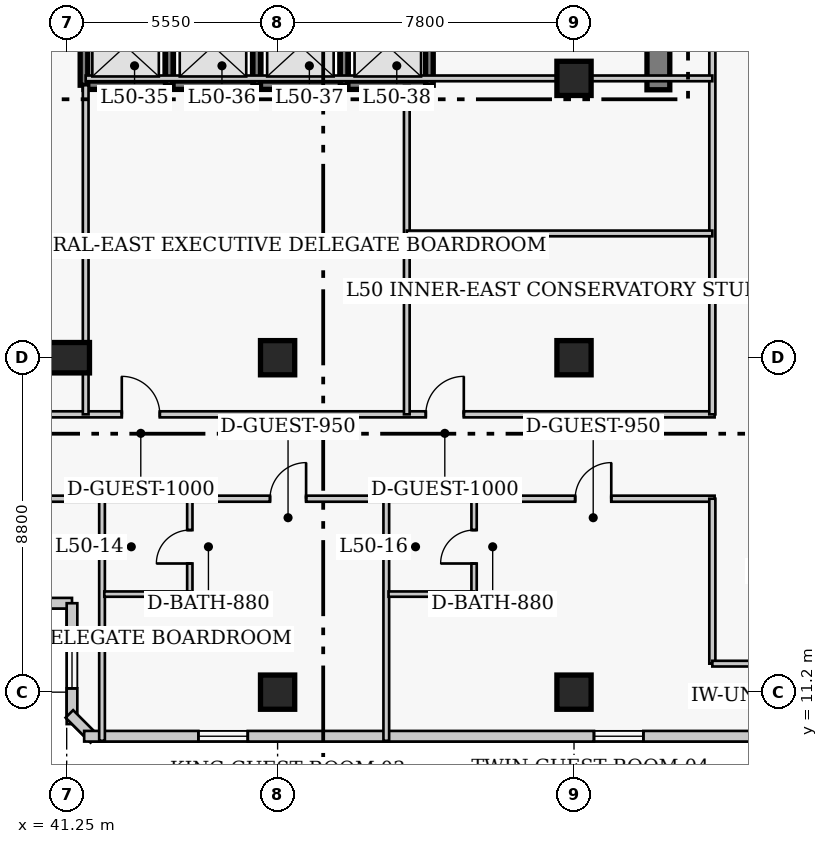
"""IFC4 building model, lengths in metres.
Left out: names, types, materials, properties, quantities, classifications, styles, units other than length and angle.
Written with IfcOpenShell. Run it as: python <this file> out.ifc"""

import sys

from ifc_helpers import new_model, si_unit, direction, frame, frame_2d, origin, origin_2d, place, context, subcontext, project, spatial, rectangle, extrude, element, fill, save


model = new_model("IFC4")
c1 = context("Model", 3, precision=1e-05, world=origin(), true_north=direction((0.0, 1.0)))
c2 = subcontext(c1, "Body", "Model", "MODEL_VIEW")
j1 = project(units=[si_unit("LENGTHUNIT", "METRE"), si_unit("PLANEANGLEUNIT", "RADIAN")], contexts=[c1])
p1 = place(None, origin())
s1 = spatial("IfcSite", under=j1, at=p1, CompositionType="ELEMENT")
p2 = place(p1, origin())
s2 = spatial("IfcBuilding", under=s1, at=p2, CompositionType="ELEMENT")
p3 = place(p2, frame((0.0, 0.0, 200.7)))
s3 = spatial("IfcBuildingStorey", under=s2, at=p3, CompositionType="ELEMENT", Elevation=200.7)
p4 = place(p3, frame((56.82, 27.05, 0.0), z_axis=(0.0, 0.0, 1.0), x_axis=(0.0, 1.0, 0.0)))
e1 = element("IfcWall", 1, at=p4, inside=s3, PredefinedType="SHEAR", context=c2, shape_type="SweptSolid", body=[
    extrude(rectangle(XDim=13.57, YDim=0.6, at=frame_2d((6.785, 0.0))), origin(), (0.0, 0.0, 1.0), 3.9),
])
p5 = place(p3, frame((41.25, 20.0, 0.0), z_axis=(0.0, 0.0, 1.0), x_axis=(1.0, 0.0, 0.0)))
e2 = element("IfcColumn", 2, at=p5, inside=s3, PredefinedType="COLUMN", context=c2, shape_type="SweptSolid", body=[
    extrude(rectangle(XDim=1.2, YDim=0.8, at=origin_2d()), origin(), (0.0, 0.0, 1.0), 3.9),
])
for number, where, z_axis, x_axis in (
    (3, (46.8, 11.2, 0.0), (0.0, 0.0, 1.0), (1.0, 0.0, 0.0)),
    (4, (46.8, 20.0, 0.0), (0.0, 0.0, 1.0), (1.0, 0.0, 0.0)),
    (5, (54.6, 11.2, 0.0), (0.0, 0.0, 1.0), (1.0, 0.0, 0.0)),
    (6, (54.6, 20.0, 0.0), (0.0, 0.0, 1.0), (1.0, 0.0, 0.0)),
    (7, (54.6, 27.35, 0.0), (0.0, 0.0, 1.0), (1.0, 0.0, 0.0)),
):
    element("IfcColumn", number, at=place(p3, frame(where, z_axis=z_axis, x_axis=x_axis)), inside=s3, PredefinedType="COLUMN", context=c2, shape_type="SweptSolid", body=[
        extrude(rectangle(XDim=0.9, YDim=0.9, at=origin_2d()), origin(), (0.0, 0.0, 1.0), 3.9),
    ])
p6 = place(p3, frame((36.61, 13.54, 0.0), z_axis=(0.0, 0.0, 1.0), x_axis=(1.0, 0.0, 0.0)))
e8 = element("IfcWall", 8, at=p6, inside=s3, PredefinedType="SOLIDWALL", context=c2, shape_type="SweptSolid", body=[
    extrude(rectangle(XDim=4.78, YDim=0.28, at=frame_2d((2.39, 0.0))), origin(), (0.0, 0.0, 1.0), 3.65),
])
p7 = place(p6, frame((1.74, 0.0, 0.85)))
e9 = element("IfcOpeningElement", 9, at=p7, cuts=e8, PredefinedType="OPENING", context=c2, shape_type="SweptSolid", body=[
    extrude(rectangle(XDim=1.3, YDim=1.7, at=frame_2d((0.65, 0.85))), frame((0.0, 0.15, 0.0), z_axis=(0.0, -1.0, 0.0), x_axis=(1.0, 0.0, 0.0)), (0.0, 0.0, 1.0), 0.3),
])
p8 = place(p3, frame((41.39, 13.54, 0.0), z_axis=(0.0, 0.0, 1.0), x_axis=(0.0, -1.0, 0.0)))
e10 = element("IfcWall", 10, at=p8, inside=s3, PredefinedType="SOLIDWALL", context=c2, shape_type="SweptSolid", body=[
    extrude(rectangle(XDim=3.18, YDim=0.28, at=frame_2d((1.59, 0.0))), origin(), (0.0, 0.0, 1.0), 3.65),
])
p9 = place(p8, frame((0.94, 0.0, 0.85)))
e11 = element("IfcOpeningElement", 11, at=p9, cuts=e10, PredefinedType="OPENING", context=c2, shape_type="SweptSolid", body=[
    extrude(rectangle(XDim=1.3, YDim=1.7, at=frame_2d((0.65, 0.85))), frame((0.0, 0.15, 0.0), z_axis=(0.0, -1.0, 0.0), x_axis=(1.0, 0.0, 0.0)), (0.0, 0.0, 1.0), 0.3),
])
p10 = place(p3, frame((41.321, 10.627, 0.0), z_axis=(0.0, 0.0, 1.0), x_axis=(0.707106781187, -0.707106781187, 0.0)))
e12 = element("IfcWall", 12, at=p10, inside=s3, PredefinedType="SOLIDWALL", context=c2, shape_type="SweptSolid", body=[
    extrude(rectangle(XDim=0.928, YDim=0.28, at=frame_2d((0.464, 0.0))), origin(), (0.0, 0.0, 1.0), 3.65),
])
p11 = place(p3, frame((41.71, 10.04, 0.0), z_axis=(0.0, 0.0, 1.0), x_axis=(1.0, 0.0, 0.0)))
e13 = element("IfcWall", 13, at=p11, inside=s3, PredefinedType="SOLIDWALL", context=c2, shape_type="SweptSolid", body=[
    extrude(rectangle(XDim=25.83, YDim=0.28, at=frame_2d((12.915, 0.0))), origin(), (0.0, 0.0, 1.0), 3.65),
])
p12 = place(p11, frame((3.005, 0.0, 0.85)))
e14 = element("IfcOpeningElement", 14, at=p12, cuts=e13, PredefinedType="OPENING", context=c2, shape_type="SweptSolid", body=[
    extrude(rectangle(XDim=1.3, YDim=1.7, at=frame_2d((0.65, 0.85))), frame((0.0, 0.15, 0.0), z_axis=(0.0, -1.0, 0.0), x_axis=(1.0, 0.0, 0.0)), (0.0, 0.0, 1.0), 0.3),
])
p13 = place(p11, frame((13.415, 0.0, 0.85)))
e15 = element("IfcOpeningElement", 15, at=p13, cuts=e13, PredefinedType="OPENING", context=c2, shape_type="SweptSolid", body=[
    extrude(rectangle(XDim=1.3, YDim=1.7, at=frame_2d((0.65, 0.85))), frame((0.0, 0.15, 0.0), z_axis=(0.0, -1.0, 0.0), x_axis=(1.0, 0.0, 0.0)), (0.0, 0.0, 1.0), 0.3),
])
p14 = place(p11, frame((21.525, 0.0, 0.85)))
e16 = element("IfcOpeningElement", 16, at=p14, cuts=e13, PredefinedType="OPENING", context=c2, shape_type="SweptSolid", body=[
    extrude(rectangle(XDim=1.3, YDim=1.7, at=frame_2d((0.65, 0.85))), frame((0.0, 0.15, 0.0), z_axis=(0.0, -1.0, 0.0), x_axis=(1.0, 0.0, 0.0)), (0.0, 0.0, 1.0), 0.3),
])
p15 = place(p3, frame((41.705, 27.17, 0.0), z_axis=(0.0, 0.0, 1.0), x_axis=(1.0, 0.0, 0.0)))
e17 = element("IfcWall", 17, at=p15, inside=s3, PredefinedType="SHEAR", context=c2, shape_type="SweptSolid", body=[
    extrude(rectangle(XDim=2.245, YDim=0.22, at=frame_2d((1.123, 0.0))), origin(), (0.0, 0.0, 1.0), 3.9),
])
p16 = place(p3, frame((41.705, 27.17, 0.0), z_axis=(0.0, 0.0, 1.0), x_axis=(0.0, 1.0, 0.0)))
e18 = element("IfcWall", 18, at=p16, inside=s3, PredefinedType="SHEAR", context=c2, shape_type="SweptSolid", body=[
    extrude(rectangle(XDim=2.06, YDim=0.2, at=frame_2d((1.03, 0.0))), origin(), (0.0, 0.0, 1.0), 3.9),
])
p17 = place(p3, frame((43.95, 27.17, 0.0), z_axis=(0.0, 0.0, 1.0), x_axis=(1.0, 0.0, 0.0)))
e19 = element("IfcWall", 19, at=p17, inside=s3, PredefinedType="SHEAR", context=c2, shape_type="SweptSolid", body=[
    extrude(rectangle(XDim=2.3, YDim=0.22, at=frame_2d((1.15, 0.0))), origin(), (0.0, 0.0, 1.0), 3.9),
])
p18 = place(p3, frame((43.95, 27.17, 0.0), z_axis=(0.0, 0.0, 1.0), x_axis=(0.0, 1.0, 0.0)))
e20 = element("IfcWall", 20, at=p18, inside=s3, PredefinedType="SHEAR", context=c2, shape_type="SweptSolid", body=[
    extrude(rectangle(XDim=2.06, YDim=0.2, at=frame_2d((1.03, 0.0))), origin(), (0.0, 0.0, 1.0), 3.9),
])
p19 = place(p3, frame((46.25, 27.17, 0.0), z_axis=(0.0, 0.0, 1.0), x_axis=(1.0, 0.0, 0.0)))
e21 = element("IfcWall", 21, at=p19, inside=s3, PredefinedType="SHEAR", context=c2, shape_type="SweptSolid", body=[
    extrude(rectangle(XDim=2.3, YDim=0.22, at=frame_2d((1.15, 0.0))), origin(), (0.0, 0.0, 1.0), 3.9),
])
p20 = place(p3, frame((46.25, 27.17, 0.0), z_axis=(0.0, 0.0, 1.0), x_axis=(0.0, 1.0, 0.0)))
e22 = element("IfcWall", 22, at=p20, inside=s3, PredefinedType="SHEAR", context=c2, shape_type="SweptSolid", body=[
    extrude(rectangle(XDim=2.06, YDim=0.2, at=frame_2d((1.03, 0.0))), origin(), (0.0, 0.0, 1.0), 3.9),
])
p21 = place(p3, frame((48.55, 27.17, 0.0), z_axis=(0.0, 0.0, 1.0), x_axis=(1.0, 0.0, 0.0)))
e23 = element("IfcWall", 23, at=p21, inside=s3, PredefinedType="SHEAR", context=c2, shape_type="SweptSolid", body=[
    extrude(rectangle(XDim=2.245, YDim=0.22, at=frame_2d((1.123, 0.0))), origin(), (0.0, 0.0, 1.0), 3.9),
])
for number, where, z_axis, x_axis in (
    (24, (48.55, 27.17, 0.0), (0.0, 0.0, 1.0), (0.0, 1.0, 0.0)),
    (25, (50.795, 27.17, 0.0), (0.0, 0.0, 1.0), (0.0, 1.0, 0.0)),
):
    element("IfcWall", number, at=place(p3, frame(where, z_axis=z_axis, x_axis=x_axis)), inside=s3, PredefinedType="SHEAR", context=c2, shape_type="SweptSolid", body=[
        extrude(rectangle(XDim=2.06, YDim=0.2, at=frame_2d((1.03, 0.0))), origin(), (0.0, 0.0, 1.0), 3.9),
    ])
p22 = place(p3, frame((35.85, 18.51, 0.0), z_axis=(0.0, 0.0, 1.0), x_axis=(1.0, 0.0, 0.0)))
e26 = element("IfcWall", 26, at=p22, inside=s3, PredefinedType="PARTITIONING", context=c2, shape_type="SweptSolid", body=[
    extrude(rectangle(XDim=22.45, YDim=0.16, at=frame_2d((11.225, 0.0))), origin(), (0.0, 0.0, 1.0), 3.65),
])
p23 = place(p22, frame((6.85, 0.0, 0.0)))
e27 = element("IfcOpeningElement", 27, at=p23, cuts=e26, PredefinedType="OPENING", context=c2, shape_type="SweptSolid", body=[
    extrude(rectangle(XDim=1.0, YDim=2.15, at=frame_2d((0.5, 1.075))), frame((0.0, 0.09, 0.0), z_axis=(0.0, -1.0, 0.0), x_axis=(1.0, 0.0, 0.0)), (0.0, 0.0, 1.0), 0.18),
])
p24 = place(p22, frame((14.85, 0.0, 0.0)))
e28 = element("IfcOpeningElement", 28, at=p24, cuts=e26, PredefinedType="OPENING", context=c2, shape_type="SweptSolid", body=[
    extrude(rectangle(XDim=1.0, YDim=2.15, at=frame_2d((0.5, 1.075))), frame((0.0, 0.09, 0.0), z_axis=(0.0, -1.0, 0.0), x_axis=(1.0, 0.0, 0.0)), (0.0, 0.0, 1.0), 0.18),
])
p25 = place(p3, frame((35.8, 16.29, 0.0), z_axis=(0.0, 0.0, 1.0), x_axis=(1.0, 0.0, 0.0)))
e29 = element("IfcWall", 29, at=p25, inside=s3, PredefinedType="PARTITIONING", context=c2, shape_type="SweptSolid", body=[
    extrude(rectangle(XDim=22.5, YDim=0.16, at=frame_2d((11.25, 0.0))), origin(), (0.0, 0.0, 1.0), 3.65),
])
p26 = place(p25, frame((2.69, 0.0, 0.0)))
e30 = element("IfcOpeningElement", 30, at=p26, cuts=e29, PredefinedType="OPENING", context=c2, shape_type="SweptSolid", body=[
    extrude(rectangle(XDim=1.0, YDim=2.15, at=frame_2d((0.5, 1.075))), frame((0.0, 0.09, 0.0), z_axis=(0.0, -1.0, 0.0), x_axis=(1.0, 0.0, 0.0)), (0.0, 0.0, 1.0), 0.18),
])
p27 = place(p25, frame((10.8, 0.0, 0.0)))
e31 = element("IfcOpeningElement", 31, at=p27, cuts=e29, PredefinedType="OPENING", context=c2, shape_type="SweptSolid", body=[
    extrude(rectangle(XDim=0.95, YDim=2.1, at=frame_2d((0.475, 1.05))), frame((0.0, 0.09, 0.0), z_axis=(0.0, -1.0, 0.0), x_axis=(1.0, 0.0, 0.0)), (0.0, 0.0, 1.0), 0.18),
])
p28 = place(p25, frame((18.83, 0.0, 0.0)))
e32 = element("IfcOpeningElement", 32, at=p28, cuts=e29, PredefinedType="OPENING", context=c2, shape_type="SweptSolid", body=[
    extrude(rectangle(XDim=0.95, YDim=2.1, at=frame_2d((0.475, 1.05))), frame((0.0, 0.09, 0.0), z_axis=(0.0, -1.0, 0.0), x_axis=(1.0, 0.0, 0.0)), (0.0, 0.0, 1.0), 0.18),
])
p29 = place(p3, frame((58.24, 18.51, 0.0), z_axis=(0.0, 0.0, 1.0), x_axis=(0.0, 1.0, 0.0)))
e33 = element("IfcWall", 33, at=p29, inside=s3, PredefinedType="PARTITIONING", context=c2, shape_type="SweptSolid", body=[
    extrude(rectangle(XDim=22.14, YDim=0.16, at=frame_2d((11.07, 0.0))), origin(), (0.0, 0.0, 1.0), 3.65),
])
p30 = place(p3, frame((58.24, 11.95, 0.0), z_axis=(0.0, 0.0, 1.0), x_axis=(0.0, 1.0, 0.0)))
e34 = element("IfcWall", 34, at=p30, inside=s3, PredefinedType="PARTITIONING", context=c2, shape_type="SweptSolid", body=[
    extrude(rectangle(XDim=4.34, YDim=0.16, at=frame_2d((2.17, 0.0))), origin(), (0.0, 0.0, 1.0), 3.65),
])
p31 = place(p3, frame((58.24, 11.95, 0.0), z_axis=(0.0, 0.0, 1.0), x_axis=(1.0, 0.0, 0.0)))
e35 = element("IfcWall", 35, at=p31, inside=s3, PredefinedType="PARTITIONING", context=c2, shape_type="SweptSolid", body=[
    extrude(rectangle(XDim=2.22, YDim=0.15, at=frame_2d((1.11, 0.0))), origin(), (0.0, 0.0, 1.0), 3.65),
])
p32 = place(p3, frame((41.75, 18.51, 0.0), z_axis=(0.0, 0.0, 1.0), x_axis=(0.0, 1.0, 0.0)))
e36 = element("IfcWall", 36, at=p32, inside=s3, PredefinedType="PARTITIONING", context=c2, shape_type="SweptSolid", body=[
    extrude(rectangle(XDim=8.66, YDim=0.15, at=frame_2d((4.33, 0.0))), origin(), (0.0, 0.0, 1.0), 3.65),
])
p33 = place(p3, frame((50.2, 18.51, 0.0), z_axis=(0.0, 0.0, 1.0), x_axis=(0.0, 1.0, 0.0)))
e37 = element("IfcWall", 37, at=p33, inside=s3, PredefinedType="PARTITIONING", context=c2, shape_type="SweptSolid", body=[
    extrude(rectangle(XDim=8.64, YDim=0.15, at=frame_2d((4.32, 0.0))), origin(), (0.0, 0.0, 1.0), 3.65),
])
p34 = place(p3, frame((41.75, 27.35, 0.0), z_axis=(0.0, 0.0, 1.0), x_axis=(1.0, 0.0, 0.0)))
e38 = element("IfcWall", 38, at=p34, inside=s3, PredefinedType="PARTITIONING", context=c2, shape_type="SweptSolid", body=[
    extrude(rectangle(XDim=16.49, YDim=0.15, at=frame_2d((8.245, 0.0))), origin(), (0.0, 0.0, 1.0), 3.65),
])
p35 = place(p3, frame((50.2, 23.27, 0.0), z_axis=(0.0, 0.0, 1.0), x_axis=(1.0, 0.0, 0.0)))
e39 = element("IfcWall", 39, at=p35, inside=s3, PredefinedType="PARTITIONING", context=c2, shape_type="SweptSolid", body=[
    extrude(rectangle(XDim=8.04, YDim=0.15, at=frame_2d((4.02, 0.0))), origin(), (0.0, 0.0, 1.0), 3.65),
])
p36 = place(p3, frame((42.18, 9.92, 0.0), z_axis=(0.0, 0.0, 1.0), x_axis=(0.0, 1.0, 0.0)))
e40 = element("IfcWall", 40, at=p36, inside=s3, PredefinedType="PARTITIONING", context=c2, shape_type="SweptSolid", body=[
    extrude(rectangle(XDim=6.37, YDim=0.15, at=frame_2d((3.185, 0.0))), origin(), (0.0, 0.0, 1.0), 3.65),
])
p37 = place(p3, frame((44.49, 13.78, 0.0), z_axis=(0.0, 0.0, 1.0), x_axis=(0.0, 1.0, 0.0)))
e41 = element("IfcWall", 41, at=p37, inside=s3, PredefinedType="PLUMBINGWALL", context=c2, shape_type="SweptSolid", body=[
    extrude(rectangle(XDim=2.49, YDim=0.14, at=frame_2d((1.245, 0.0))), origin(), (0.0, 0.0, 1.0), 3.65),
])
p38 = place(p37, frame((0.805, 0.0, 0.0)))
e42 = element("IfcOpeningElement", 42, at=p38, cuts=e41, PredefinedType="OPENING", context=c2, shape_type="SweptSolid", body=[
    extrude(rectangle(XDim=0.88, YDim=2.05, at=frame_2d((0.44, 1.025))), frame((0.0, 0.08, 0.0), z_axis=(0.0, -1.0, 0.0), x_axis=(1.0, 0.0, 0.0)), (0.0, 0.0, 1.0), 0.16),
])
p39 = place(p3, frame((42.24, 13.78, 0.0), z_axis=(0.0, 0.0, 1.0), x_axis=(1.0, 0.0, 0.0)))
e43 = element("IfcWall", 43, at=p39, inside=s3, PredefinedType="PLUMBINGWALL", context=c2, shape_type="SweptSolid", body=[
    extrude(rectangle(XDim=2.25, YDim=0.14, at=frame_2d((1.125, 0.0))), origin(), (0.0, 0.0, 1.0), 3.65),
])
p40 = place(p3, frame((49.66, 9.92, 0.0), z_axis=(0.0, 0.0, 1.0), x_axis=(0.0, 1.0, 0.0)))
e44 = element("IfcWall", 44, at=p40, inside=s3, PredefinedType="PARTITIONING", context=c2, shape_type="SweptSolid", body=[
    extrude(rectangle(XDim=6.37, YDim=0.15, at=frame_2d((3.185, 0.0))), origin(), (0.0, 0.0, 1.0), 3.65),
])
p41 = place(p3, frame((51.97, 13.78, 0.0), z_axis=(0.0, 0.0, 1.0), x_axis=(0.0, 1.0, 0.0)))
e45 = element("IfcWall", 45, at=p41, inside=s3, PredefinedType="PLUMBINGWALL", context=c2, shape_type="SweptSolid", body=[
    extrude(rectangle(XDim=2.49, YDim=0.14, at=frame_2d((1.245, 0.0))), origin(), (0.0, 0.0, 1.0), 3.65),
])
p42 = place(p41, frame((0.805, 0.0, 0.0)))
e46 = element("IfcOpeningElement", 46, at=p42, cuts=e45, PredefinedType="OPENING", context=c2, shape_type="SweptSolid", body=[
    extrude(rectangle(XDim=0.88, YDim=2.05, at=frame_2d((0.44, 1.025))), frame((0.0, 0.08, 0.0), z_axis=(0.0, -1.0, 0.0), x_axis=(1.0, 0.0, 0.0)), (0.0, 0.0, 1.0), 0.16),
])
p43 = place(p3, frame((49.72, 13.78, 0.0), z_axis=(0.0, 0.0, 1.0), x_axis=(1.0, 0.0, 0.0)))
e47 = element("IfcWall", 47, at=p43, inside=s3, PredefinedType="PLUMBINGWALL", context=c2, shape_type="SweptSolid", body=[
    extrude(rectangle(XDim=2.25, YDim=0.14, at=frame_2d((1.125, 0.0))), origin(), (0.0, 0.0, 1.0), 3.65),
])
p44 = place(p9, origin())
e48 = element("IfcWindow", 48, at=p44, inside=s3, PartitioningType="SINGLE_PANEL", PredefinedType="WINDOW", context=c2, shape_type="SweptSolid", body=[
    extrude(rectangle(XDim=1.3, YDim=1.7, at=frame_2d((0.65, 0.85))), frame((0.0, 0.03, 0.0), z_axis=(0.0, -1.0, 0.0), x_axis=(1.0, 0.0, 0.0)), (0.0, 0.0, 1.0), 0.06),
])
fill(e11, e48)
p45 = place(p12, origin())
e49 = element("IfcWindow", 49, at=p45, inside=s3, PartitioningType="SINGLE_PANEL", PredefinedType="WINDOW", context=c2, shape_type="SweptSolid", body=[
    extrude(rectangle(XDim=1.3, YDim=1.7, at=frame_2d((0.65, 0.85))), frame((0.0, 0.03, 0.0), z_axis=(0.0, -1.0, 0.0), x_axis=(1.0, 0.0, 0.0)), (0.0, 0.0, 1.0), 0.06),
])
fill(e14, e49)
p46 = place(p13, origin())
e50 = element("IfcWindow", 50, at=p46, inside=s3, PartitioningType="SINGLE_PANEL", PredefinedType="WINDOW", context=c2, shape_type="SweptSolid", body=[
    extrude(rectangle(XDim=1.3, YDim=1.7, at=frame_2d((0.65, 0.85))), frame((0.0, 0.03, 0.0), z_axis=(0.0, -1.0, 0.0), x_axis=(1.0, 0.0, 0.0)), (0.0, 0.0, 1.0), 0.06),
])
fill(e15, e50)
p47 = place(p23, origin())
e51 = element("IfcDoor", 51, at=p47, inside=s3, OperationType="SINGLE_SWING_LEFT", PredefinedType="DOOR", context=c2, shape_type="SweptSolid", body=[
    extrude(rectangle(XDim=1.0, YDim=2.15, at=frame_2d((0.5, 1.075))), frame((0.0, 0.025, 0.0), z_axis=(0.0, -1.0, 0.0), x_axis=(1.0, 0.0, 0.0)), (0.0, 0.0, 1.0), 0.05),
])
fill(e27, e51)
p48 = place(p24, origin())
e52 = element("IfcDoor", 52, at=p48, inside=s3, OperationType="SINGLE_SWING_RIGHT", PredefinedType="DOOR", context=c2, shape_type="SweptSolid", body=[
    extrude(rectangle(XDim=1.0, YDim=2.15, at=frame_2d((0.5, 1.075))), frame((0.0, 0.025, 0.0), z_axis=(0.0, -1.0, 0.0), x_axis=(1.0, 0.0, 0.0)), (0.0, 0.0, 1.0), 0.05),
])
fill(e28, e52)
p49 = place(p38, origin())
e53 = element("IfcDoor", 53, at=p49, inside=s3, OperationType="SINGLE_SWING_LEFT", PredefinedType="DOOR", context=c2, shape_type="SweptSolid", body=[
    extrude(rectangle(XDim=0.88, YDim=2.05, at=frame_2d((0.44, 1.025))), frame((0.0, 0.025, 0.0), z_axis=(0.0, -1.0, 0.0), x_axis=(1.0, 0.0, 0.0)), (0.0, 0.0, 1.0), 0.05),
])
fill(e42, e53)
p50 = place(p27, origin())
e54 = element("IfcDoor", 54, at=p50, inside=s3, OperationType="SINGLE_SWING_RIGHT", PredefinedType="DOOR", context=c2, shape_type="SweptSolid", body=[
    extrude(rectangle(XDim=0.95, YDim=2.1, at=frame_2d((0.475, 1.05))), frame((0.0, 0.025, 0.0), z_axis=(0.0, -1.0, 0.0), x_axis=(1.0, 0.0, 0.0)), (0.0, 0.0, 1.0), 0.05),
])
fill(e31, e54)
p51 = place(p42, origin())
e55 = element("IfcDoor", 55, at=p51, inside=s3, OperationType="SINGLE_SWING_LEFT", PredefinedType="DOOR", context=c2, shape_type="SweptSolid", body=[
    extrude(rectangle(XDim=0.88, YDim=2.05, at=frame_2d((0.44, 1.025))), frame((0.0, 0.025, 0.0), z_axis=(0.0, -1.0, 0.0), x_axis=(1.0, 0.0, 0.0)), (0.0, 0.0, 1.0), 0.05),
])
fill(e46, e55)
p52 = place(p28, origin())
e56 = element("IfcDoor", 56, at=p52, inside=s3, OperationType="SINGLE_SWING_RIGHT", PredefinedType="DOOR", context=c2, shape_type="SweptSolid", body=[
    extrude(rectangle(XDim=0.95, YDim=2.1, at=frame_2d((0.475, 1.05))), frame((0.0, 0.025, 0.0), z_axis=(0.0, -1.0, 0.0), x_axis=(1.0, 0.0, 0.0)), (0.0, 0.0, 1.0), 0.05),
])
fill(e32, e56)
save(model, sys.argv[1])
